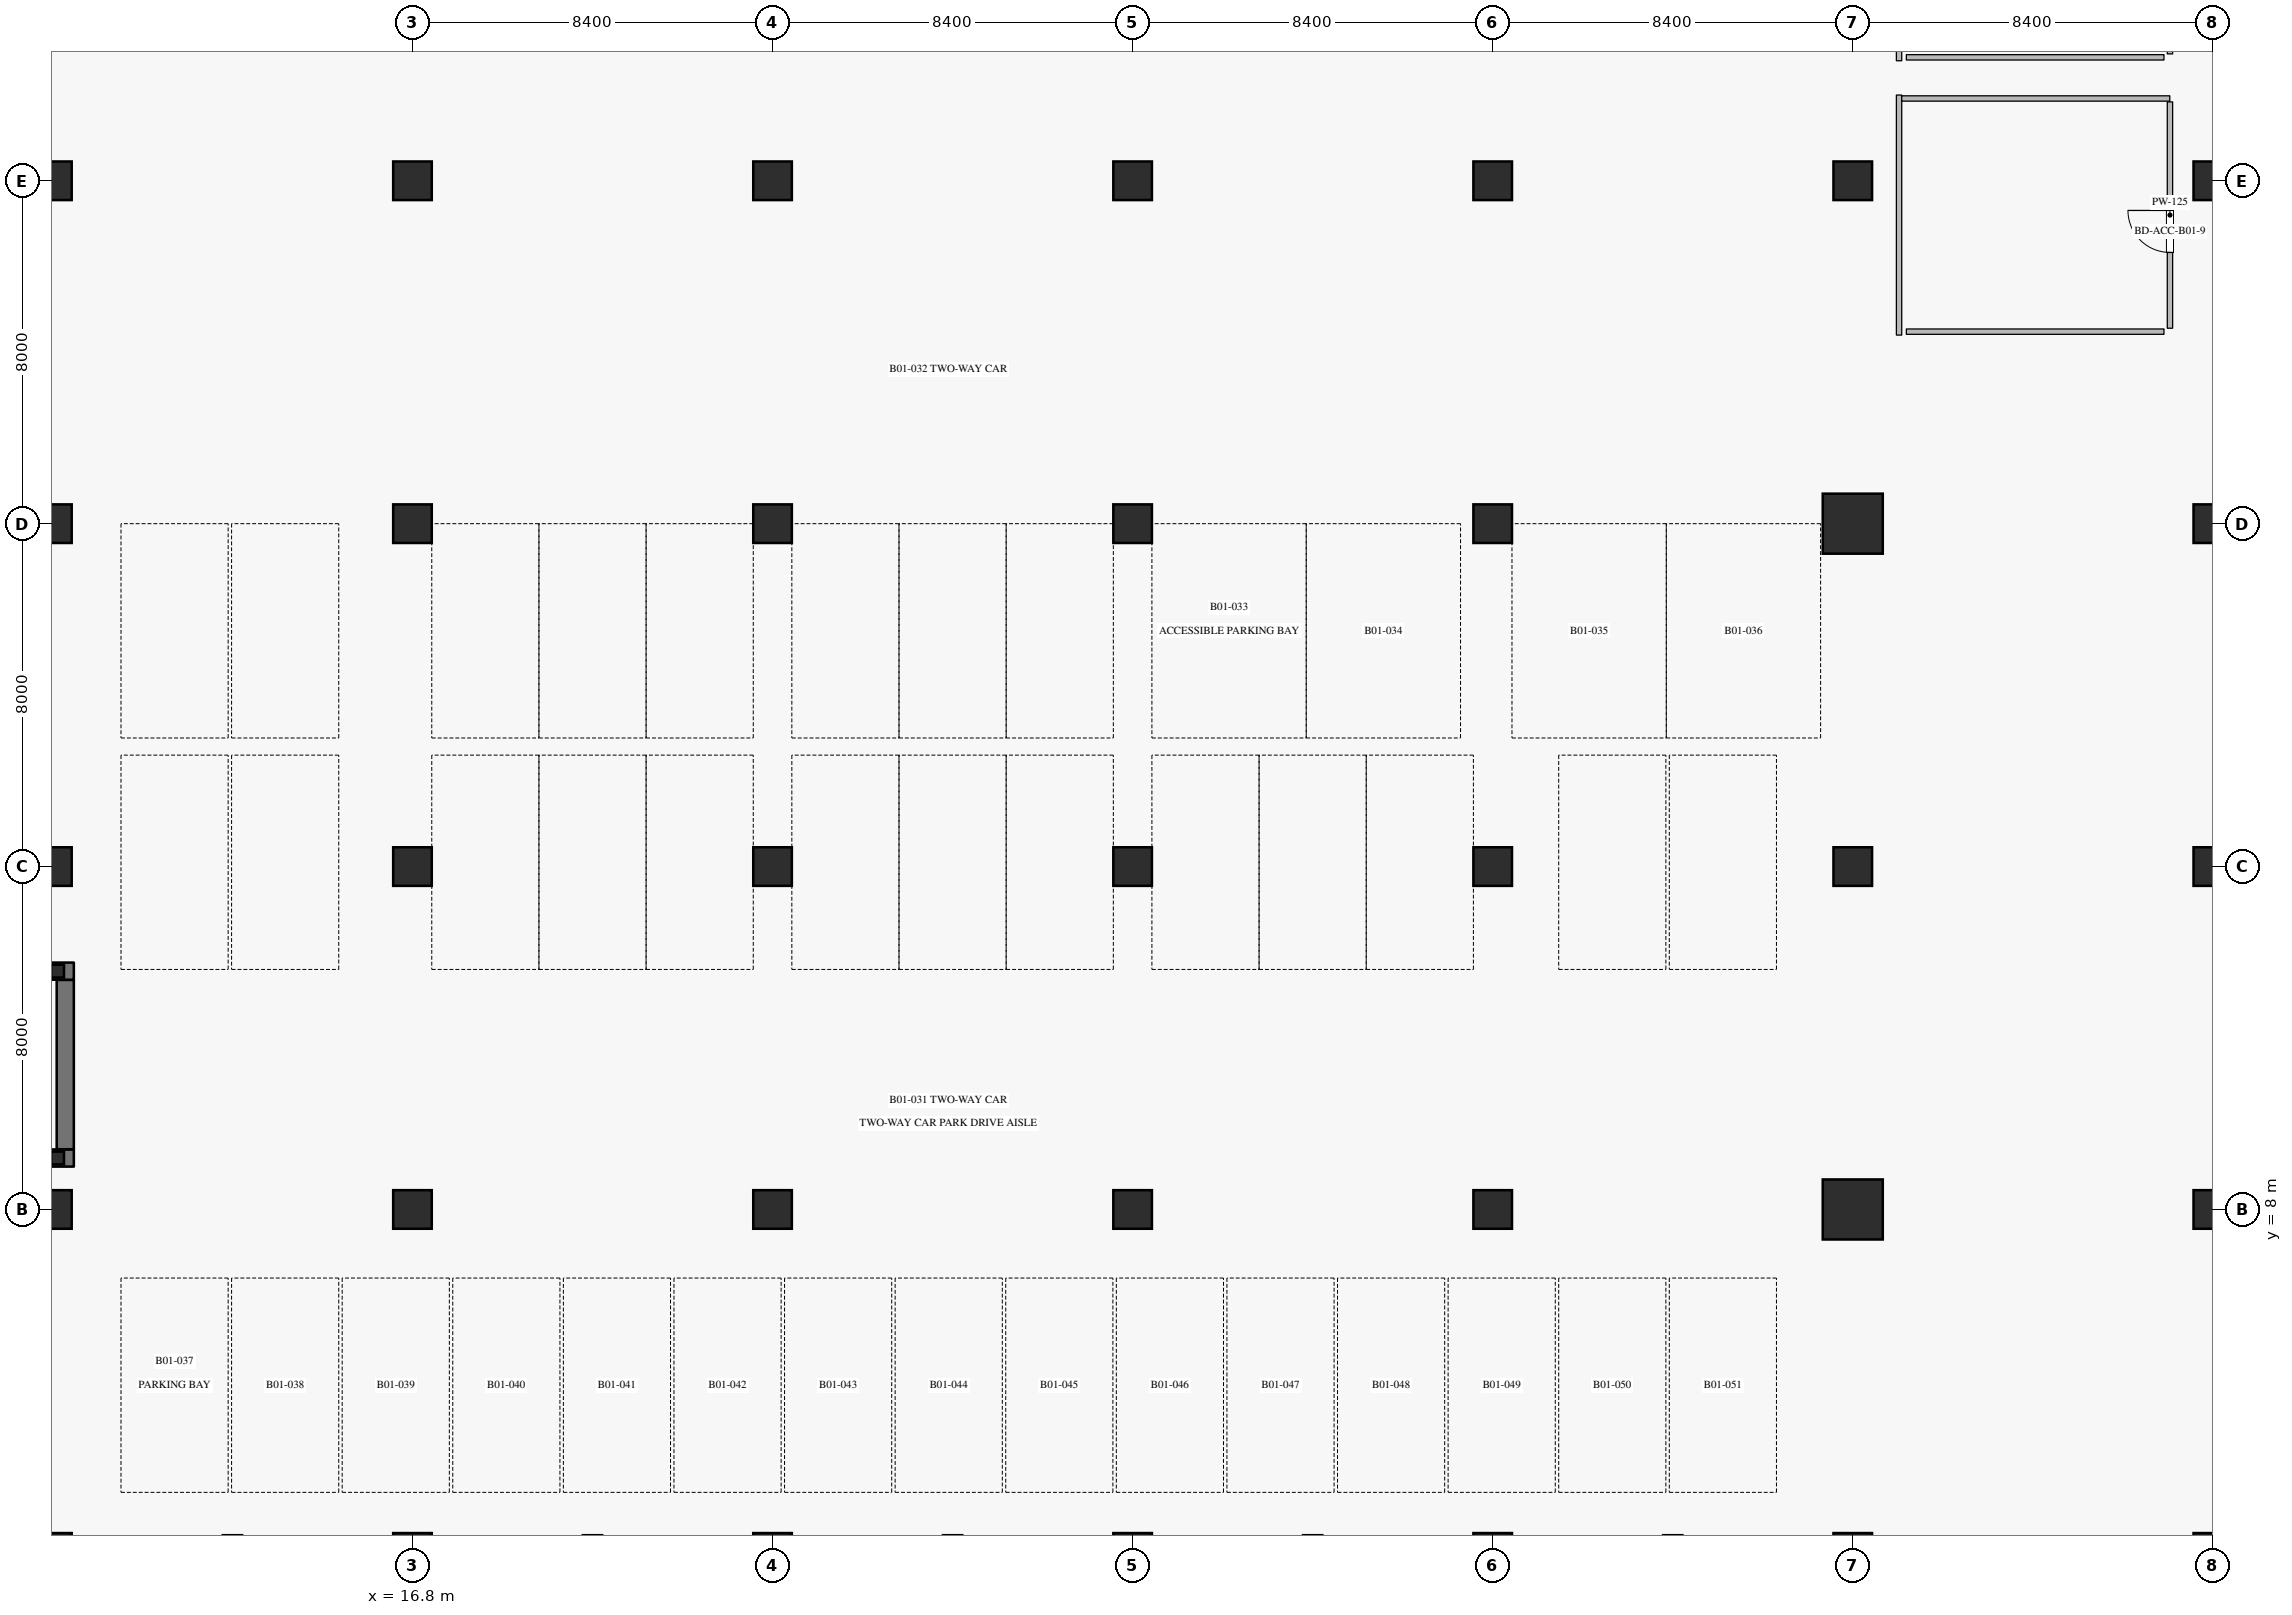
"""IFC4 building model, lengths in metres.
Left out: names, types, materials, properties, quantities, classifications, styles, units other than length and angle.
Written with IfcOpenShell. Run it as: python <this file> out.ifc"""

import sys

from ifc_helpers import new_model, si_unit, direction, frame, frame_2d, origin, origin_2d, place, context, subcontext, project, spatial, rectangle, hollow_rectangle, circle, extrude, element, fill, save


model = new_model("IFC4")
c1 = context("Model", 3, precision=1e-05, world=origin(), true_north=direction((0.0, 1.0)))
c2 = subcontext(c1, "Body", "Model", "MODEL_VIEW")
j1 = project(units=[si_unit("LENGTHUNIT", "METRE"), si_unit("PLANEANGLEUNIT", "RADIAN")], contexts=[c1])
p1 = place(None, origin())
s1 = spatial("IfcSite", under=j1, at=p1, CompositionType="ELEMENT")
p2 = place(p1, origin())
s2 = spatial("IfcBuilding", under=s1, at=p2, CompositionType="ELEMENT")
p3 = place(p2, frame((0.0, 0.0, -5.4)))
s3 = spatial("IfcBuildingStorey", under=s2, at=p3, CompositionType="ELEMENT", Elevation=-5.4)
for number, where, z_axis, x_axis in (
    (1, (8.4, 0.0, 0.0), (0.0, 0.0, 1.0), (1.0, 0.0, 0.0)),
    (2, (8.4, 8.0, 0.0), (0.0, 0.0, 1.0), (1.0, 0.0, 0.0)),
    (3, (8.4, 16.0, 0.0), (0.0, 0.0, 1.0), (1.0, 0.0, 0.0)),
    (4, (8.4, 24.0, 0.0), (0.0, 0.0, 1.0), (1.0, 0.0, 0.0)),
    (5, (8.4, 32.0, 0.0), (0.0, 0.0, 1.0), (1.0, 0.0, 0.0)),
):
    element("IfcColumn", number, at=place(p3, frame(where, z_axis=z_axis, x_axis=x_axis)), inside=s3, PredefinedType="COLUMN", context=c2, shape_type="SweptSolid", body=[
        extrude(rectangle(XDim=0.9, YDim=0.9, at=origin_2d()), origin(), (0.0, 0.0, 1.0), 5.4),
    ])
p4 = place(p3, frame((12.6, 0.0, 0.0), z_axis=(0.0, 0.0, 1.0), x_axis=(1.0, 0.0, 0.0)))
e6 = element("IfcColumn", 6, at=p4, inside=s3, PredefinedType="PILASTER", context=c2, shape_type="SweptSolid", body=[
    extrude(rectangle(XDim=0.45, YDim=0.8, at=origin_2d()), origin(), (0.0, 0.0, 1.0), 5.4),
])
for number, where, z_axis, x_axis in (
    (7, (16.8, 0.0, 0.0), (0.0, 0.0, 1.0), (1.0, 0.0, 0.0)),
    (8, (16.8, 8.0, 0.0), (0.0, 0.0, 1.0), (1.0, 0.0, 0.0)),
    (9, (16.8, 16.0, 0.0), (0.0, 0.0, 1.0), (1.0, 0.0, 0.0)),
    (10, (16.8, 24.0, 0.0), (0.0, 0.0, 1.0), (1.0, 0.0, 0.0)),
    (11, (16.8, 32.0, 0.0), (0.0, 0.0, 1.0), (1.0, 0.0, 0.0)),
):
    element("IfcColumn", number, at=place(p3, frame(where, z_axis=z_axis, x_axis=x_axis)), inside=s3, PredefinedType="COLUMN", context=c2, shape_type="SweptSolid", body=[
        extrude(rectangle(XDim=0.9, YDim=0.9, at=origin_2d()), origin(), (0.0, 0.0, 1.0), 5.4),
    ])
p5 = place(p3, frame((21.0, 0.0, 0.0), z_axis=(0.0, 0.0, 1.0), x_axis=(1.0, 0.0, 0.0)))
e12 = element("IfcColumn", 12, at=p5, inside=s3, PredefinedType="PILASTER", context=c2, shape_type="SweptSolid", body=[
    extrude(rectangle(XDim=0.45, YDim=0.8, at=origin_2d()), origin(), (0.0, 0.0, 1.0), 5.4),
])
for number, where, z_axis, x_axis in (
    (13, (25.2, 0.0, 0.0), (0.0, 0.0, 1.0), (1.0, 0.0, 0.0)),
    (14, (25.2, 8.0, 0.0), (0.0, 0.0, 1.0), (1.0, 0.0, 0.0)),
    (15, (25.2, 16.0, 0.0), (0.0, 0.0, 1.0), (1.0, 0.0, 0.0)),
    (16, (25.2, 24.0, 0.0), (0.0, 0.0, 1.0), (1.0, 0.0, 0.0)),
    (17, (25.2, 32.0, 0.0), (0.0, 0.0, 1.0), (1.0, 0.0, 0.0)),
):
    element("IfcColumn", number, at=place(p3, frame(where, z_axis=z_axis, x_axis=x_axis)), inside=s3, PredefinedType="COLUMN", context=c2, shape_type="SweptSolid", body=[
        extrude(rectangle(XDim=0.9, YDim=0.9, at=origin_2d()), origin(), (0.0, 0.0, 1.0), 5.4),
    ])
p6 = place(p3, frame((29.4, 0.0, 0.0), z_axis=(0.0, 0.0, 1.0), x_axis=(1.0, 0.0, 0.0)))
e18 = element("IfcColumn", 18, at=p6, inside=s3, PredefinedType="PILASTER", context=c2, shape_type="SweptSolid", body=[
    extrude(rectangle(XDim=0.45, YDim=0.8, at=origin_2d()), origin(), (0.0, 0.0, 1.0), 5.4),
])
for number, where, z_axis, x_axis in (
    (19, (33.6, 0.0, 0.0), (0.0, 0.0, 1.0), (1.0, 0.0, 0.0)),
    (20, (33.6, 8.0, 0.0), (0.0, 0.0, 1.0), (1.0, 0.0, 0.0)),
    (21, (33.6, 16.0, 0.0), (0.0, 0.0, 1.0), (1.0, 0.0, 0.0)),
    (22, (33.6, 24.0, 0.0), (0.0, 0.0, 1.0), (1.0, 0.0, 0.0)),
    (23, (33.6, 32.0, 0.0), (0.0, 0.0, 1.0), (1.0, 0.0, 0.0)),
):
    element("IfcColumn", number, at=place(p3, frame(where, z_axis=z_axis, x_axis=x_axis)), inside=s3, PredefinedType="COLUMN", context=c2, shape_type="SweptSolid", body=[
        extrude(rectangle(XDim=0.9, YDim=0.9, at=origin_2d()), origin(), (0.0, 0.0, 1.0), 5.4),
    ])
p7 = place(p3, frame((37.8, 0.0, 0.0), z_axis=(0.0, 0.0, 1.0), x_axis=(1.0, 0.0, 0.0)))
e24 = element("IfcColumn", 24, at=p7, inside=s3, PredefinedType="PILASTER", context=c2, shape_type="SweptSolid", body=[
    extrude(rectangle(XDim=0.45, YDim=0.8, at=origin_2d()), origin(), (0.0, 0.0, 1.0), 5.4),
])
for number, where, z_axis, x_axis in (
    (25, (42.0, 0.0, 0.0), (0.0, 0.0, 1.0), (1.0, 0.0, 0.0)),
    (26, (42.0, 8.0, 0.0), (0.0, 0.0, 1.0), (1.0, 0.0, 0.0)),
    (27, (42.0, 16.0, 0.0), (0.0, 0.0, 1.0), (1.0, 0.0, 0.0)),
    (28, (42.0, 24.0, 0.0), (0.0, 0.0, 1.0), (1.0, 0.0, 0.0)),
    (29, (42.0, 32.0, 0.0), (0.0, 0.0, 1.0), (1.0, 0.0, 0.0)),
):
    element("IfcColumn", number, at=place(p3, frame(where, z_axis=z_axis, x_axis=x_axis)), inside=s3, PredefinedType="COLUMN", context=c2, shape_type="SweptSolid", body=[
        extrude(rectangle(XDim=0.9, YDim=0.9, at=origin_2d()), origin(), (0.0, 0.0, 1.0), 5.4),
    ])
p8 = place(p3, frame((46.2, 0.0, 0.0), z_axis=(0.0, 0.0, 1.0), x_axis=(1.0, 0.0, 0.0)))
e30 = element("IfcColumn", 30, at=p8, inside=s3, PredefinedType="PILASTER", context=c2, shape_type="SweptSolid", body=[
    extrude(rectangle(XDim=0.45, YDim=0.8, at=origin_2d()), origin(), (0.0, 0.0, 1.0), 5.4),
])
p9 = place(p3, frame((50.4, 0.0, 0.0), z_axis=(0.0, 0.0, 1.0), x_axis=(1.0, 0.0, 0.0)))
e31 = element("IfcColumn", 31, at=p9, inside=s3, PredefinedType="COLUMN", context=c2, shape_type="SweptSolid", body=[
    extrude(rectangle(XDim=0.9, YDim=0.9, at=origin_2d()), origin(), (0.0, 0.0, 1.0), 5.4),
])
p10 = place(p3, frame((50.4, 8.0, 0.0), z_axis=(0.0, 0.0, 1.0), x_axis=(1.0, 0.0, 0.0)))
e32 = element("IfcColumn", 32, at=p10, inside=s3, PredefinedType="COLUMN", context=c2, shape_type="SweptSolid", body=[
    extrude(circle(Radius=0.7, at=origin_2d()), origin(), (0.0, 0.0, 1.0), 5.4),
])
p11 = place(p3, frame((50.4, 16.0, 0.0), z_axis=(0.0, 0.0, 1.0), x_axis=(1.0, 0.0, 0.0)))
e33 = element("IfcColumn", 33, at=p11, inside=s3, PredefinedType="COLUMN", context=c2, shape_type="SweptSolid", body=[
    extrude(rectangle(XDim=0.9, YDim=0.9, at=origin_2d()), origin(), (0.0, 0.0, 1.0), 5.4),
])
p12 = place(p3, frame((50.4, 24.0, 0.0), z_axis=(0.0, 0.0, 1.0), x_axis=(1.0, 0.0, 0.0)))
e34 = element("IfcColumn", 34, at=p12, inside=s3, PredefinedType="COLUMN", context=c2, shape_type="SweptSolid", body=[
    extrude(circle(Radius=0.7, at=origin_2d()), origin(), (0.0, 0.0, 1.0), 5.4),
])
for number, where, z_axis, x_axis in (
    (35, (50.4, 32.0, 0.0), (0.0, 0.0, 1.0), (1.0, 0.0, 0.0)),
    (36, (58.8, 0.0, 0.0), (0.0, 0.0, 1.0), (1.0, 0.0, 0.0)),
    (37, (58.8, 8.0, 0.0), (0.0, 0.0, 1.0), (1.0, 0.0, 0.0)),
    (38, (58.8, 16.0, 0.0), (0.0, 0.0, 1.0), (1.0, 0.0, 0.0)),
    (39, (58.8, 24.0, 0.0), (0.0, 0.0, 1.0), (1.0, 0.0, 0.0)),
    (40, (58.8, 32.0, 0.0), (0.0, 0.0, 1.0), (1.0, 0.0, 0.0)),
):
    element("IfcColumn", number, at=place(p3, frame(where, z_axis=z_axis, x_axis=x_axis)), inside=s3, PredefinedType="COLUMN", context=c2, shape_type="SweptSolid", body=[
        extrude(rectangle(XDim=0.9, YDim=0.9, at=origin_2d()), origin(), (0.0, 0.0, 1.0), 5.4),
    ])
p13 = place(p3, frame((0.225, 9.2, 0.0), z_axis=(0.0, 0.0, 1.0), x_axis=(1.0, 0.0, 0.0)))
e41 = element("IfcWall", 41, at=p13, inside=s3, PredefinedType="SHEAR", context=c2, shape_type="SweptSolid", body=[
    extrude(rectangle(XDim=8.675, YDim=0.4, at=frame_2d((4.337, 0.0))), origin(), (0.0, 0.0, 1.0), 4.995),
])
p14 = place(p3, frame((8.7, 9.405, 0.0), z_axis=(0.0, 0.0, 1.0), x_axis=(0.0, 1.0, 0.0)))
e42 = element("IfcWall", 42, at=p14, inside=s3, PredefinedType="SHEAR", context=c2, shape_type="SweptSolid", body=[
    extrude(rectangle(XDim=3.95, YDim=0.4, at=frame_2d((1.975, 0.0))), origin(), (0.0, 0.0, 1.0), 4.995),
])
p15 = place(p3, frame((0.225, 13.56, 0.0), z_axis=(0.0, 0.0, 1.0), x_axis=(1.0, 0.0, 0.0)))
e43 = element("IfcWall", 43, at=p15, inside=s3, PredefinedType="SHEAR", context=c2, shape_type="SweptSolid", body=[
    extrude(rectangle(XDim=8.675, YDim=0.4, at=frame_2d((4.337, 0.0))), origin(), (0.0, 0.0, 1.0), 4.995),
])
p16 = place(p15, frame((1.095, 0.0, 0.0)))
e44 = element("IfcOpeningElement", 44, at=p16, cuts=e43, PredefinedType="OPENING", context=c2, shape_type="SweptSolid", body=[
    extrude(rectangle(XDim=1.16, YDim=2.2, at=frame_2d((0.58, 1.1))), frame((0.0, 0.21, 0.0), z_axis=(0.0, -1.0, 0.0), x_axis=(1.0, 0.0, 0.0)), (0.0, 0.0, 1.0), 0.42),
])
for number, where, z_axis, x_axis in (
    (45, (8.52, 9.2, 0.0), (0.0, 0.0, 1.0), (1.0, 0.0, 0.0)),
    (46, (8.52, 13.56, 0.0), (0.0, 0.0, 1.0), (1.0, 0.0, 0.0)),
):
    element("IfcColumn", number, at=place(p3, frame(where, z_axis=z_axis, x_axis=x_axis)), inside=s3, PredefinedType="COLUMN", context=c2, shape_type="SweptSolid", body=[
        extrude(hollow_rectangle(XDim=0.3, YDim=0.3, WallThickness=0.012, at=origin_2d()), origin(), (0.0, 0.0, 1.0), 2.52),
    ])
p17 = place(p3, frame((57.8, 28.56, 0.0), z_axis=(0.0, 0.0, 1.0), x_axis=(0.0, 1.0, 0.0)))
e47 = element("IfcWall", 47, at=p17, inside=s3, PredefinedType="PARTITIONING", context=c2, shape_type="SweptSolid", body=[
    extrude(rectangle(XDim=5.28, YDim=0.125, at=frame_2d((2.64, 0.0))), origin(), (0.0, 0.0, 1.0), 4.995),
])
p18 = place(p17, frame((1.768, 0.0, 0.0)))
e48 = element("IfcOpeningElement", 48, at=p18, cuts=e47, PredefinedType="OPENING", context=c2, shape_type="SweptSolid", body=[
    extrude(rectangle(XDim=0.98, YDim=2.15, at=frame_2d((0.49, 1.075))), frame((0.0, 0.073, 0.0), z_axis=(0.0, -1.0, 0.0), x_axis=(1.0, 0.0, 0.0)), (0.0, 0.0, 1.0), 0.145),
])
p19 = place(p3, frame((51.65, 28.48, 0.0), z_axis=(0.0, 0.0, 1.0), x_axis=(1.0, 0.0, 0.0)))
e49 = element("IfcWall", 49, at=p19, inside=s3, PredefinedType="PARTITIONING", context=c2, shape_type="SweptSolid", body=[
    extrude(rectangle(XDim=6.01, YDim=0.125, at=frame_2d((3.005, 0.0))), origin(), (0.0, 0.0, 1.0), 4.995),
])
p20 = place(p3, frame((57.8, 34.96, 0.0), z_axis=(0.0, 0.0, 1.0), x_axis=(0.0, 1.0, 0.0)))
e50 = element("IfcWall", 50, at=p20, inside=s3, PredefinedType="PARTITIONING", context=c2, shape_type="SweptSolid", body=[
    extrude(rectangle(XDim=6.88, YDim=0.125, at=frame_2d((3.44, 0.0))), origin(), (0.0, 0.0, 1.0), 4.995),
])
p21 = place(p20, frame((3.01, 0.0, 0.0)))
e51 = element("IfcOpeningElement", 51, at=p21, cuts=e50, PredefinedType="OPENING", context=c2, shape_type="SweptSolid", body=[
    extrude(rectangle(XDim=0.86, YDim=2.12, at=frame_2d((0.43, 1.06))), frame((0.0, 0.073, 0.0), z_axis=(0.0, -1.0, 0.0), x_axis=(1.0, 0.0, 0.0)), (0.0, 0.0, 1.0), 0.145),
])
p22 = place(p3, frame((51.65, 34.88, 0.0), z_axis=(0.0, 0.0, 1.0), x_axis=(1.0, 0.0, 0.0)))
e52 = element("IfcWall", 52, at=p22, inside=s3, PredefinedType="PARTITIONING", context=c2, shape_type="SweptSolid", body=[
    extrude(rectangle(XDim=6.01, YDim=0.125, at=frame_2d((3.005, 0.0))), origin(), (0.0, 0.0, 1.0), 4.995),
])
p23 = place(p3, frame((51.48, 28.4, 0.0), z_axis=(0.0, 0.0, 1.0), x_axis=(0.0, 1.0, 0.0)))
e53 = element("IfcWall", 53, at=p23, inside=s3, PredefinedType="PARTITIONING", context=c2, shape_type="SweptSolid", body=[
    extrude(rectangle(XDim=5.6, YDim=0.125, at=frame_2d((2.8, 0.0))), origin(), (0.0, 0.0, 1.0), 4.995),
])
p24 = place(p3, frame((51.542, 33.92, 0.0), z_axis=(0.0, 0.0, 1.0), x_axis=(1.0, 0.0, 0.0)))
e54 = element("IfcWall", 54, at=p24, inside=s3, PredefinedType="PARTITIONING", context=c2, shape_type="SweptSolid", body=[
    extrude(rectangle(XDim=6.254, YDim=0.125, at=frame_2d((3.127, 0.0))), origin(), (0.0, 0.0, 1.0), 4.995),
])
p25 = place(p3, frame((51.48, 34.8, 0.0), z_axis=(0.0, 0.0, 1.0), x_axis=(0.0, 1.0, 0.0)))
e55 = element("IfcWall", 55, at=p25, inside=s3, PredefinedType="PARTITIONING", context=c2, shape_type="SweptSolid", body=[
    extrude(rectangle(XDim=7.2, YDim=0.125, at=frame_2d((3.6, 0.0))), origin(), (0.0, 0.0, 1.0), 4.995),
])
p26 = place(p18, origin())
e56 = element("IfcDoor", 56, at=p26, inside=s3, OperationType="SINGLE_SWING_RIGHT", PredefinedType="DOOR", context=c2, shape_type="SweptSolid", body=[
    extrude(rectangle(XDim=0.98, YDim=2.15, at=frame_2d((0.49, 1.075))), frame((0.0, 0.025, 0.0), z_axis=(0.0, -1.0, 0.0), x_axis=(1.0, 0.0, 0.0)), (0.0, 0.0, 1.0), 0.05),
])
fill(e48, e56)
save(model, sys.argv[1])
